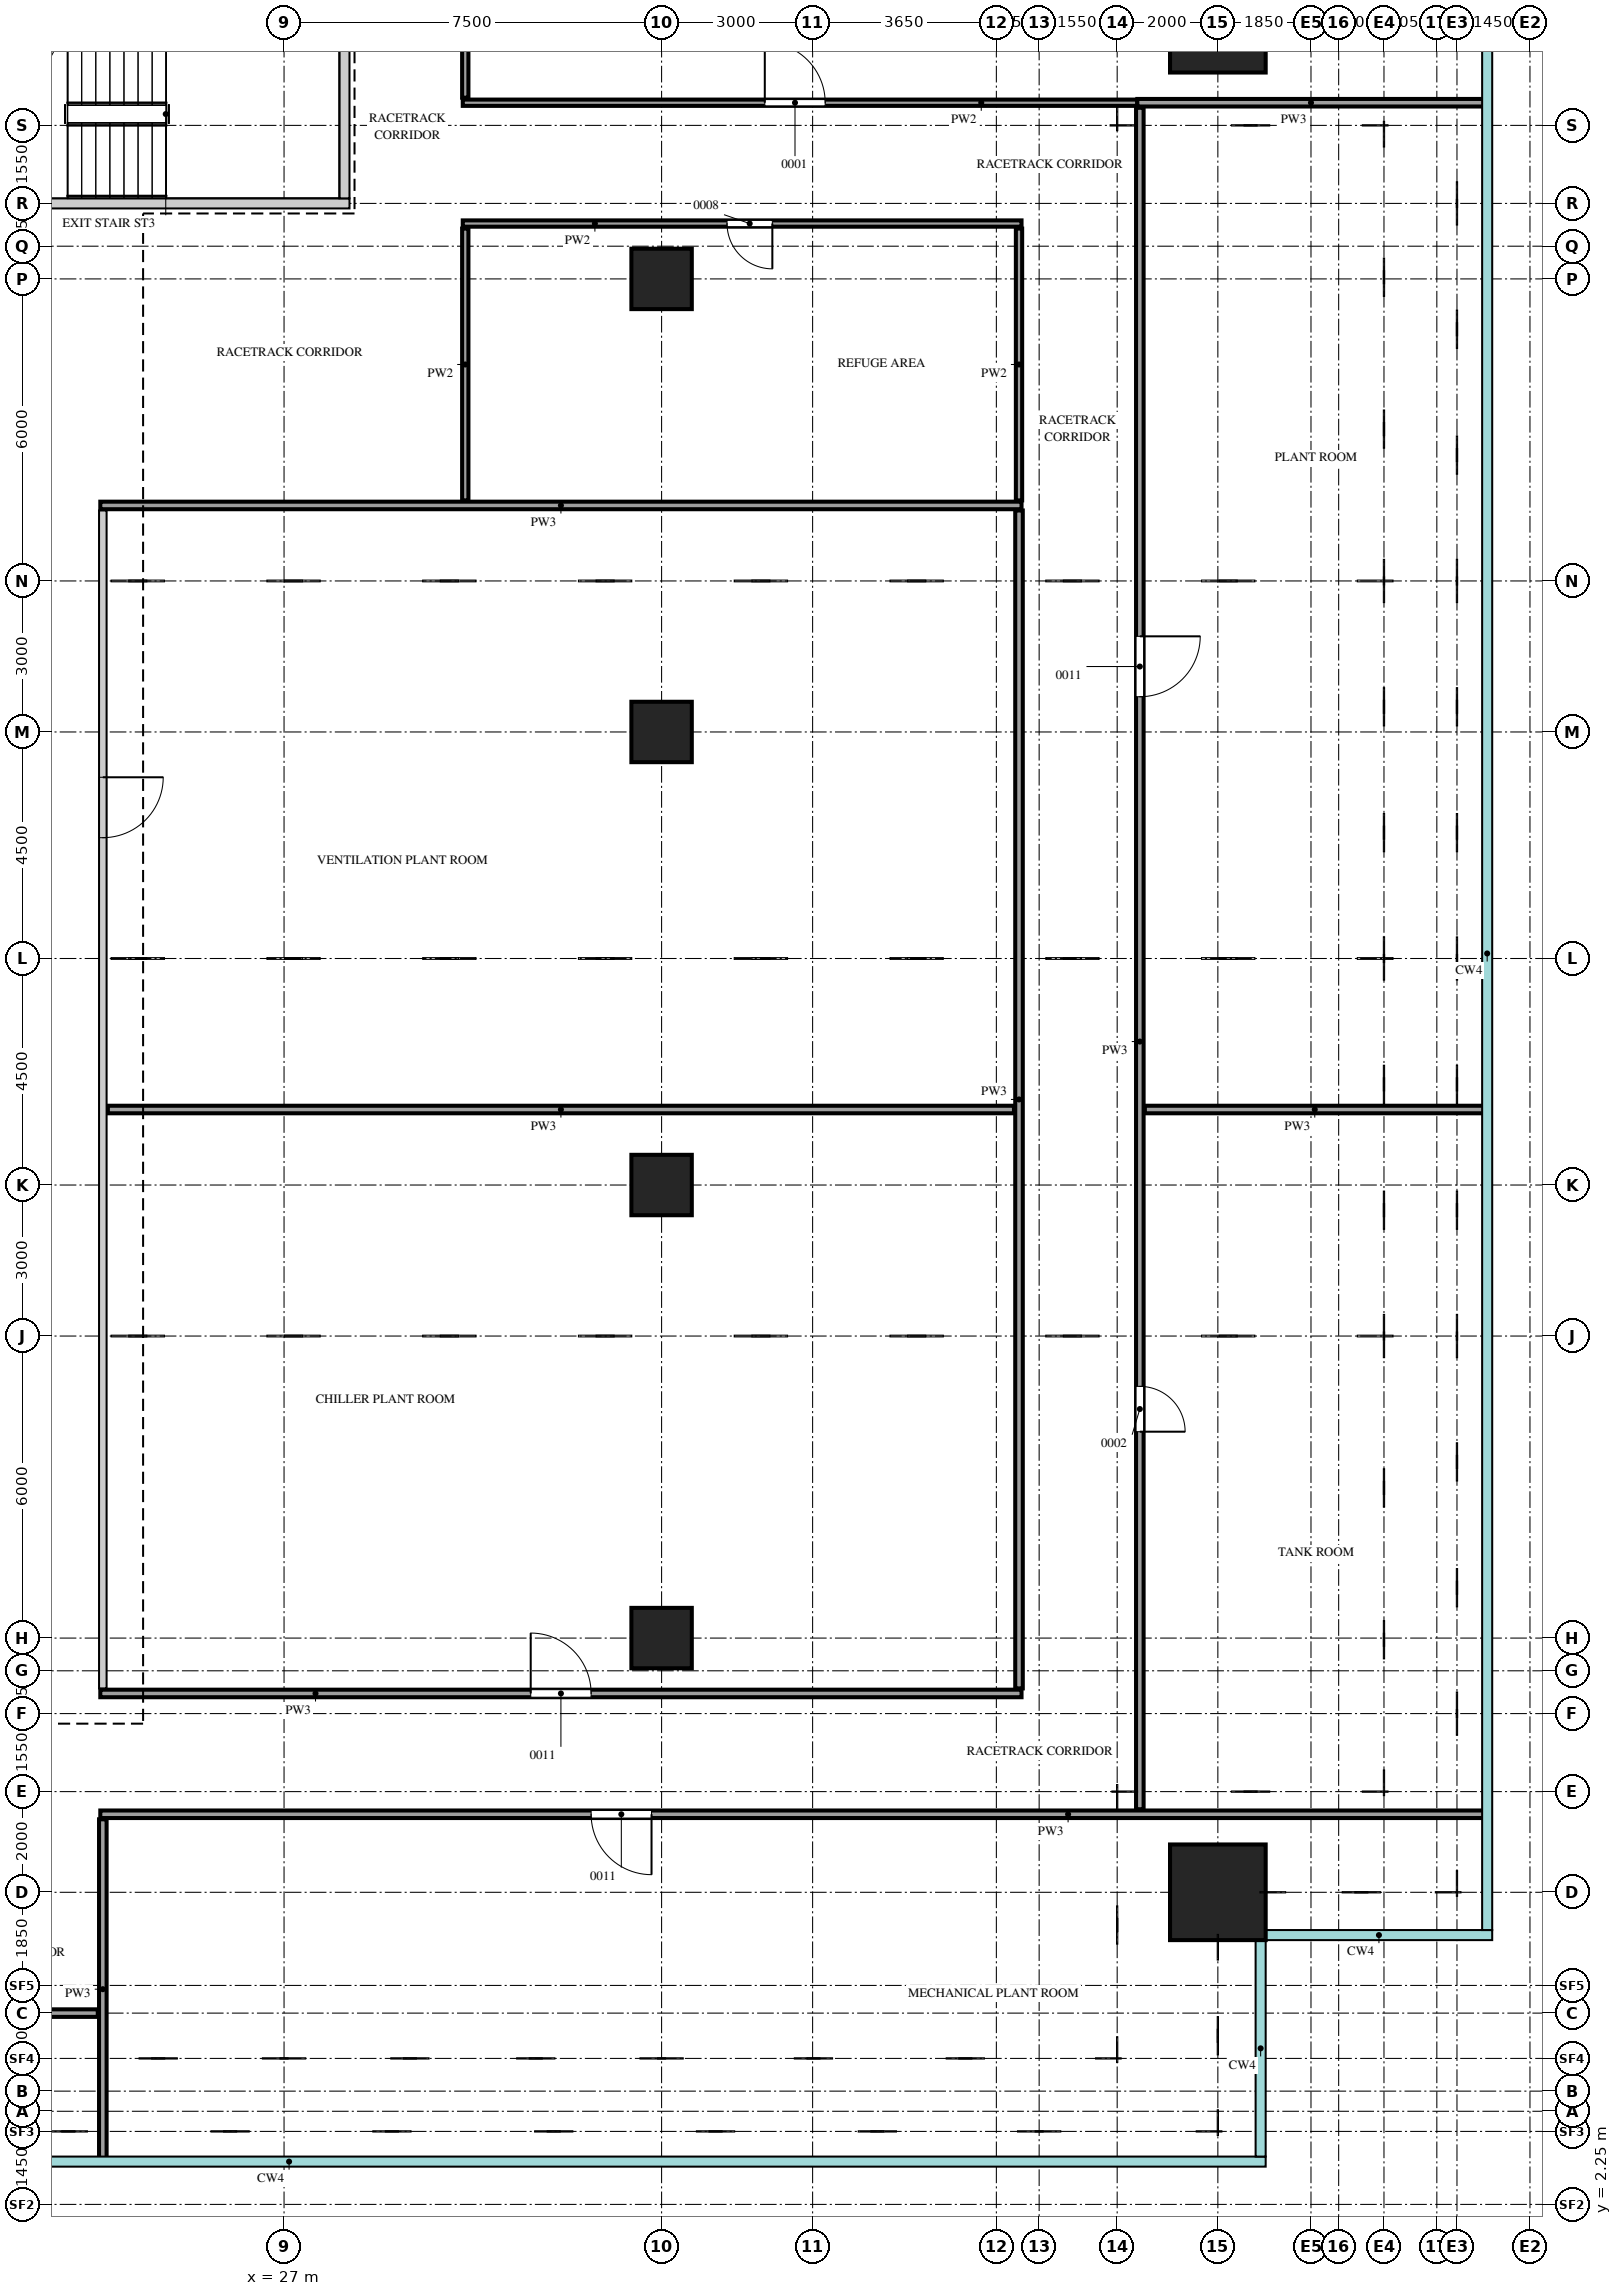
"""IFC4 building model, lengths in metres.
Left out: names, types, materials, properties, quantities, classifications, styles, units other than length and angle.
Written with IfcOpenShell. Run it as: python <this file> out.ifc"""

import sys

from ifc_helpers import new_model, si_unit, direction, frame, frame_2d, origin, origin_2d, place, context, subcontext, project, spatial, rectangle, extrude, source, transform, mapped, element, fill, save


model = new_model("IFC4")
c1 = context("Model", 3, precision=1e-05, world=origin(), true_north=direction((0.0, 1.0)))
c2 = subcontext(c1, "Body", "Model", "MODEL_VIEW")
j1 = project(units=[si_unit("LENGTHUNIT", "METRE"), si_unit("PLANEANGLEUNIT", "RADIAN")], contexts=[c1])
p1 = place(None, origin())
s1 = spatial("IfcSite", under=j1, at=p1, CompositionType="ELEMENT")
p2 = place(p1, origin())
s2 = spatial("IfcBuilding", under=s1, at=p2, CompositionType="ELEMENT")
p3 = place(p2, frame((0.0, 0.0, 216.7)))
s3 = spatial("IfcBuildingStorey", under=s2, at=p3, CompositionType="ELEMENT", Elevation=216.7)
m1 = source(origin(), c2, "Body", "SweptSolid", [
    extrude(rectangle(XDim=7.1, YDim=0.2, at=frame_2d((3.55, 0.0))), origin(), (0.0, 0.0, 1.0), 5.25),
])
p4 = place(p3, frame((21.2, 42.0, 0.0), z_axis=(0.0, 0.0, 1.0), x_axis=(1.0, 0.0, 0.0)))
e1 = element("IfcWall", 1, at=p4, inside=s3, PredefinedType="SHEAR", context=c2, shape_type="MappedRepresentation", body=[
    mapped(m1, transform((0.0, 0.0, 0.0))),
])
m2 = source(origin(), c2, "Body", "SweptSolid", [
    extrude(rectangle(XDim=3.35, YDim=0.2, at=frame_2d((1.675, 0.0))), origin(), (0.0, 0.0, 1.0), 5.25),
])
p5 = place(p3, frame((28.2, 42.1, 0.0), z_axis=(0.0, 0.0, 1.0), x_axis=(0.0, 1.0, 0.0)))
e2 = element("IfcWall", 2, at=p5, inside=s3, PredefinedType="SHEAR", context=c2, shape_type="MappedRepresentation", body=[
    mapped(m2, transform((0.0, 0.0, 0.0))),
])
m3 = source(origin(), c2, "Body", "SweptSolid", [
    extrude(rectangle(XDim=1.9, YDim=1.9, at=origin_2d()), origin(), (0.0, 0.0, 1.0), 5.5),
])
for number, where, z_axis, x_axis in (
    (3, (45.55, 45.55, 0.0), (0.0, 0.0, 1.0), (1.0, 0.0, 0.0)),
    (4, (45.55, 8.45, 0.0), (0.0, 0.0, 1.0), (1.0, 0.0, 0.0)),
):
    element("IfcColumn", number, at=place(p3, frame(where, z_axis=z_axis, x_axis=x_axis)), inside=s3, PredefinedType="COLUMN", context=c2, shape_type="MappedRepresentation", body=[
        mapped(m3, transform((0.0, 0.0, 0.0))),
    ])
m4 = source(origin(), c2, "Body", "SweptSolid", [
    extrude(rectangle(XDim=1.2, YDim=1.2, at=origin_2d()), origin(), (0.0, 0.0, 1.0), 5.25),
])
for number, where, z_axis, x_axis in (
    (5, (34.5, 13.5, 0.0), (0.0, 0.0, 1.0), (1.0, 0.0, 0.0)),
    (6, (34.5, 22.5, 0.0), (0.0, 0.0, 1.0), (1.0, 0.0, 0.0)),
    (7, (34.5, 31.5, 0.0), (0.0, 0.0, 1.0), (1.0, 0.0, 0.0)),
    (8, (34.5, 40.5, 0.0), (0.0, 0.0, 1.0), (1.0, 0.0, 0.0)),
):
    element("IfcColumn", number, at=place(p3, frame(where, z_axis=z_axis, x_axis=x_axis)), inside=s3, PredefinedType="COLUMN", context=c2, shape_type="MappedRepresentation", body=[
        mapped(m4, transform((0.0, 0.0, 0.0))),
    ])
m5 = source(origin(), c2, "Body", "SweptSolid", [
    extrude(rectangle(XDim=6.75, YDim=0.15, at=frame_2d((3.375, 0.0))), origin(), (0.0, 0.0, 1.0), 5.25),
])
p6 = place(p3, frame((23.4, 3.15, 0.0), z_axis=(0.0, 0.0, 1.0), x_axis=(0.0, 1.0, 0.0)))
e9 = element("IfcWall", 9, at=p6, inside=s3, PredefinedType="PARTITIONING", context=c2, shape_type="MappedRepresentation", body=[
    mapped(m5, transform((0.0, 0.0, 0.0))),
])
m6 = source(origin(), c2, "Body", "SweptSolid", [
    extrude(rectangle(XDim=11.35, YDim=0.15, at=frame_2d((5.675, 0.0))), origin(), (0.0, 0.0, 1.0), 5.25),
])
p7 = place(p3, frame((11.95, 6.05, 0.0), z_axis=(0.0, 0.0, 1.0), x_axis=(1.0, 0.0, 0.0)))
e10 = element("IfcWall", 10, at=p7, inside=s3, PredefinedType="PARTITIONING", context=c2, shape_type="MappedRepresentation", body=[
    mapped(m6, transform((0.0, 0.0, 0.0))),
])
m7 = source(origin(), c2, "Body", "SweptSolid", [
    extrude(rectangle(XDim=0.9, YDim=2.1, at=frame_2d((0.45, 1.05))), frame((0.0, 0.085, 0.0), z_axis=(0.0, -1.0, 0.0), x_axis=(1.0, 0.0, 0.0)), (0.0, 0.0, 1.0), 0.17),
])
p8 = place(p7, frame((5.3, 0.0, 0.0)))
e11 = element("IfcOpeningElement", 11, at=p8, cuts=e10, PredefinedType="OPENING", context=c2, shape_type="MappedRepresentation", body=[
    mapped(m7, transform((0.0, 0.0, 0.0))),
])
m8 = source(origin(), c2, "Body", "SweptSolid", [
    extrude(rectangle(XDim=27.5, YDim=0.15, at=frame_2d((13.75, 0.0))), origin(), (0.0, 0.0, 1.0), 5.25),
])
p9 = place(p3, frame((23.35, 10.0, 0.0), z_axis=(0.0, 0.0, 1.0), x_axis=(1.0, 0.0, 0.0)))
e12 = element("IfcWall", 12, at=p9, inside=s3, PredefinedType="PARTITIONING", context=c2, shape_type="MappedRepresentation", body=[
    mapped(m8, transform((0.0, 0.0, 0.0))),
])
m9 = source(origin(), c2, "Body", "SweptSolid", [
    extrude(rectangle(XDim=1.2, YDim=2.1, at=frame_2d((0.6, 1.05))), frame((0.0, 0.085, 0.0), z_axis=(0.0, -1.0, 0.0), x_axis=(1.0, 0.0, 0.0)), (0.0, 0.0, 1.0), 0.17),
])
p10 = place(p9, frame((9.75, 0.0, 0.0)))
e13 = element("IfcOpeningElement", 13, at=p10, cuts=e12, PredefinedType="OPENING", context=c2, shape_type="MappedRepresentation", body=[
    mapped(m9, transform((0.0, 0.0, 0.0))),
])
m10 = source(origin(), c2, "Body", "SweptSolid", [
    extrude(rectangle(XDim=33.8, YDim=0.15, at=frame_2d((16.9, 0.0))), origin(), (0.0, 0.0, 1.0), 5.25),
])
p11 = place(p3, frame((44.0, 10.1, 0.0), z_axis=(0.0, 0.0, 1.0), x_axis=(0.0, 1.0, 0.0)))
e14 = element("IfcWall", 14, at=p11, inside=s3, PredefinedType="PARTITIONING", context=c2, shape_type="MappedRepresentation", body=[
    mapped(m10, transform((0.0, 0.0, 0.0))),
])
p12 = place(p11, frame((7.5, 0.0, 0.0)))
e15 = element("IfcOpeningElement", 15, at=p12, cuts=e14, PredefinedType="OPENING", context=c2, shape_type="MappedRepresentation", body=[
    mapped(m7, transform((0.0, 0.0, 0.0))),
])
p13 = place(p11, frame((22.1, 0.0, 0.0)))
e16 = element("IfcOpeningElement", 16, at=p13, cuts=e14, PredefinedType="OPENING", context=c2, shape_type="MappedRepresentation", body=[
    mapped(m9, transform((0.0, 0.0, 0.0))),
])
m11 = source(origin(), c2, "Body", "SweptSolid", [
    extrude(rectangle(XDim=18.3, YDim=0.15, at=frame_2d((9.15, 0.0))), origin(), (0.0, 0.0, 1.0), 5.25),
])
p14 = place(p3, frame((23.35, 12.4, 0.0), z_axis=(0.0, 0.0, 1.0), x_axis=(1.0, 0.0, 0.0)))
e17 = element("IfcWall", 17, at=p14, inside=s3, PredefinedType="PARTITIONING", context=c2, shape_type="MappedRepresentation", body=[
    mapped(m11, transform((0.0, 0.0, 0.0))),
])
p15 = place(p14, frame((8.55, 0.0, 0.0)))
e18 = element("IfcOpeningElement", 18, at=p15, cuts=e17, PredefinedType="OPENING", context=c2, shape_type="MappedRepresentation", body=[
    mapped(m9, transform((0.0, 0.0, 0.0))),
])
m12 = source(origin(), c2, "Body", "SweptSolid", [
    extrude(rectangle(XDim=23.4, YDim=0.15, at=frame_2d((11.7, 0.0))), origin(), (0.0, 0.0, 1.0), 5.25),
])
p16 = place(p3, frame((23.4, 12.5, 0.0), z_axis=(0.0, 0.0, 1.0), x_axis=(0.0, 1.0, 0.0)))
e19 = element("IfcWall", 19, at=p16, inside=s3, PredefinedType="PARTITIONING", context=c2, shape_type="MappedRepresentation", body=[
    mapped(m12, transform((0.0, 0.0, 0.0))),
])
p17 = place(p16, frame((16.9, 0.0, 0.0)))
e20 = element("IfcOpeningElement", 20, at=p17, cuts=e19, PredefinedType="OPENING", context=c2, shape_type="MappedRepresentation", body=[
    mapped(m9, transform((0.0, 0.0, 0.0))),
])
p18 = place(p3, frame((41.6, 12.5, 0.0), z_axis=(0.0, 0.0, 1.0), x_axis=(0.0, 1.0, 0.0)))
e21 = element("IfcWall", 21, at=p18, inside=s3, PredefinedType="PARTITIONING", context=c2, shape_type="MappedRepresentation", body=[
    mapped(m12, transform((0.0, 0.0, 0.0))),
])
m13 = source(origin(), c2, "Body", "SweptSolid", [
    extrude(rectangle(XDim=18.0, YDim=0.15, at=frame_2d((9.0, 0.0))), origin(), (0.0, 0.0, 1.0), 5.25),
])
p19 = place(p3, frame((23.5, 24.0, 0.0), z_axis=(0.0, 0.0, 1.0), x_axis=(1.0, 0.0, 0.0)))
e22 = element("IfcWall", 22, at=p19, inside=s3, PredefinedType="PARTITIONING", context=c2, shape_type="MappedRepresentation", body=[
    mapped(m13, transform((0.0, 0.0, 0.0))),
])
p20 = place(p3, frame((44.1, 24.0, 0.0), z_axis=(0.0, 0.0, 1.0), x_axis=(1.0, 0.0, 0.0)))
e23 = element("IfcWall", 23, at=p20, inside=s3, PredefinedType="PARTITIONING", context=c2, shape_type="MappedRepresentation", body=[
    mapped(m5, transform((0.0, 0.0, 0.0))),
])
p21 = place(p3, frame((23.35, 36.0, 0.0), z_axis=(0.0, 0.0, 1.0), x_axis=(1.0, 0.0, 0.0)))
e24 = element("IfcWall", 24, at=p21, inside=s3, PredefinedType="PARTITIONING", context=c2, shape_type="MappedRepresentation", body=[
    mapped(m11, transform((0.0, 0.0, 0.0))),
])
m14 = source(origin(), c2, "Body", "SweptSolid", [
    extrude(rectangle(XDim=5.4, YDim=0.125, at=frame_2d((2.7, 0.0))), origin(), (0.0, 0.0, 1.0), 5.25),
])
for number, where, z_axis, x_axis in (
    (25, (30.6, 36.1, 0.0), (0.0, 0.0, 1.0), (0.0, 1.0, 0.0)),
    (26, (41.6, 36.1, 0.0), (0.0, 0.0, 1.0), (0.0, 1.0, 0.0)),
):
    element("IfcWall", number, at=place(p3, frame(where, z_axis=z_axis, x_axis=x_axis)), inside=s3, PredefinedType="PARTITIONING", context=c2, shape_type="MappedRepresentation", body=[
        mapped(m14, transform((0.0, 0.0, 0.0))),
    ])
m15 = source(origin(), c2, "Body", "SweptSolid", [
    extrude(rectangle(XDim=11.1, YDim=0.125, at=frame_2d((5.55, 0.0))), origin(), (0.0, 0.0, 1.0), 5.25),
])
p22 = place(p3, frame((30.55, 41.6, 0.0), z_axis=(0.0, 0.0, 1.0), x_axis=(1.0, 0.0, 0.0)))
e27 = element("IfcWall", 27, at=p22, inside=s3, PredefinedType="PARTITIONING", context=c2, shape_type="MappedRepresentation", body=[
    mapped(m15, transform((0.0, 0.0, 0.0))),
])
m16 = source(origin(), c2, "Body", "SweptSolid", [
    extrude(rectangle(XDim=0.9, YDim=2.1, at=frame_2d((0.45, 1.05))), frame((0.0, 0.073, 0.0), z_axis=(0.0, -1.0, 0.0), x_axis=(1.0, 0.0, 0.0)), (0.0, 0.0, 1.0), 0.145),
])
p23 = place(p22, frame((5.25, 0.0, 0.0)))
e28 = element("IfcOpeningElement", 28, at=p23, cuts=e27, PredefinedType="OPENING", context=c2, shape_type="MappedRepresentation", body=[
    mapped(m16, transform((0.0, 0.0, 0.0))),
])
m17 = source(origin(), c2, "Body", "SweptSolid", [
    extrude(rectangle(XDim=13.4, YDim=0.125, at=frame_2d((6.7, 0.0))), origin(), (0.0, 0.0, 1.0), 5.25),
])
p24 = place(p3, frame((30.55, 44.0, 0.0), z_axis=(0.0, 0.0, 1.0), x_axis=(1.0, 0.0, 0.0)))
e29 = element("IfcWall", 29, at=p24, inside=s3, PredefinedType="PARTITIONING", context=c2, shape_type="MappedRepresentation", body=[
    mapped(m17, transform((0.0, 0.0, 0.0))),
])
m18 = source(origin(), c2, "Body", "SweptSolid", [
    extrude(rectangle(XDim=1.2, YDim=2.1, at=frame_2d((0.6, 1.05))), frame((0.0, 0.073, 0.0), z_axis=(0.0, -1.0, 0.0), x_axis=(1.0, 0.0, 0.0)), (0.0, 0.0, 1.0), 0.145),
])
p25 = place(p24, frame((6.0, 0.0, 0.0)))
e30 = element("IfcOpeningElement", 30, at=p25, cuts=e29, PredefinedType="OPENING", context=c2, shape_type="MappedRepresentation", body=[
    mapped(m18, transform((0.0, 0.0, 0.0))),
])
m19 = source(origin(), c2, "Body", "SweptSolid", [
    extrude(rectangle(XDim=6.9, YDim=0.15, at=frame_2d((3.45, 0.0))), origin(), (0.0, 0.0, 1.0), 5.25),
])
p26 = place(p3, frame((43.95, 44.0, 0.0), z_axis=(0.0, 0.0, 1.0), x_axis=(1.0, 0.0, 0.0)))
e31 = element("IfcWall", 31, at=p26, inside=s3, PredefinedType="PARTITIONING", context=c2, shape_type="MappedRepresentation", body=[
    mapped(m19, transform((0.0, 0.0, 0.0))),
])
m20 = source(origin(), c2, "Body", "SweptSolid", [
    extrude(rectangle(XDim=3.85, YDim=0.125, at=frame_2d((1.925, 0.0))), origin(), (0.0, 0.0, 1.0), 5.25),
])
p27 = place(p3, frame((30.6, 44.1, 0.0), z_axis=(0.0, 0.0, 1.0), x_axis=(0.0, 1.0, 0.0)))
e32 = element("IfcWall", 32, at=p27, inside=s3, PredefinedType="PARTITIONING", context=c2, shape_type="MappedRepresentation", body=[
    mapped(m20, transform((0.0, 0.0, 0.0))),
])
m21 = source(origin(), c2, "Body", "SweptSolid", [
    extrude(rectangle(XDim=1.2, YDim=2.1, at=frame_2d((0.6, 1.05))), frame((0.0, 0.025, 0.0), z_axis=(0.0, -1.0, 0.0), x_axis=(1.0, 0.0, 0.0)), (0.0, 0.0, 1.0), 0.05),
])
p28 = place(p10, origin())
e33 = element("IfcDoor", 33, at=p28, inside=s3, OperationType="SINGLE_SWING_RIGHT", PredefinedType="DOOR", context=c2, shape_type="MappedRepresentation", body=[
    mapped(m21, transform((0.0, 0.0, 0.0))),
])
fill(e13, e33)
m22 = source(origin(), c2, "Body", "SweptSolid", [
    extrude(rectangle(XDim=0.9, YDim=2.1, at=frame_2d((0.45, 1.05))), frame((0.0, 0.025, 0.0), z_axis=(0.0, -1.0, 0.0), x_axis=(1.0, 0.0, 0.0)), (0.0, 0.0, 1.0), 0.05),
])
p29 = place(p12, origin())
e34 = element("IfcDoor", 34, at=p29, inside=s3, OperationType="SINGLE_SWING_LEFT", PredefinedType="DOOR", context=c2, shape_type="MappedRepresentation", body=[
    mapped(m22, transform((0.0, 0.0, 0.0))),
])
fill(e15, e34)
p30 = place(p13, origin())
e35 = element("IfcDoor", 35, at=p30, inside=s3, OperationType="SINGLE_SWING_RIGHT", PredefinedType="DOOR", context=c2, shape_type="MappedRepresentation", body=[
    mapped(m21, transform((0.0, 0.0, 0.0))),
])
fill(e16, e35)
p31 = place(p25, origin())
e36 = element("IfcDoor", 36, at=p31, inside=s3, OperationType="SINGLE_SWING_RIGHT", PredefinedType="DOOR", context=c2, shape_type="MappedRepresentation", body=[
    mapped(m21, transform((0.0, 0.0, 0.0))),
])
fill(e30, e36)
p32 = place(p15, origin())
e37 = element("IfcDoor", 37, at=p32, inside=s3, OperationType="SINGLE_SWING_RIGHT", PredefinedType="DOOR", context=c2, shape_type="MappedRepresentation", body=[
    mapped(m21, transform((0.0, 0.0, 0.0))),
])
fill(e18, e37)
p33 = place(p17, origin())
e38 = element("IfcDoor", 38, at=p33, inside=s3, OperationType="SINGLE_SWING_RIGHT", PredefinedType="DOOR", context=c2, shape_type="MappedRepresentation", body=[
    mapped(m21, transform((0.0, 0.0, 0.0))),
])
fill(e20, e38)
p34 = place(p23, origin())
e39 = element("IfcDoor", 39, at=p34, inside=s3, OperationType="SINGLE_SWING_RIGHT", PredefinedType="DOOR", context=c2, shape_type="MappedRepresentation", body=[
    mapped(m22, transform((0.0, 0.0, 0.0))),
])
fill(e28, e39)
save(model, sys.argv[1])
